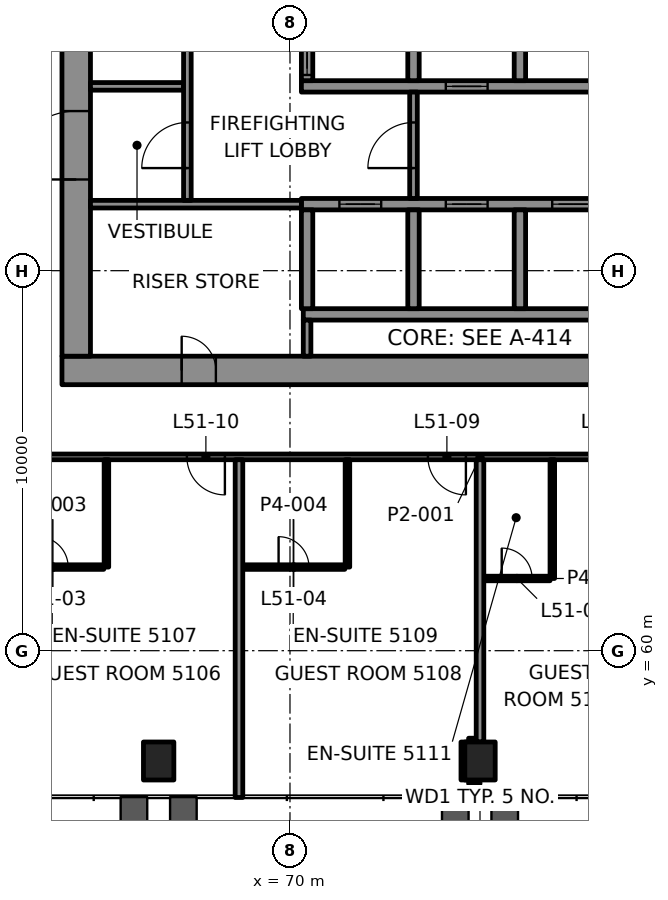
"""IFC4 building model, lengths in metres.
Left out: names, types, materials, properties, quantities, classifications, styles, units other than length and angle.
Written with IfcOpenShell. Run it as: python <this file> out.ifc"""

import sys

from ifc_helpers import new_model, si_unit, direction, frame, frame_2d, origin, origin_2d, place, context, subcontext, project, spatial, rectangle, hollow_rectangle, extrude, element, fill, save


model = new_model("IFC4")
c1 = context("Model", 3, precision=1e-05, world=origin(), true_north=direction((0.0, 1.0)))
c2 = subcontext(c1, "Body", "Model", "MODEL_VIEW")
j1 = project(units=[si_unit("LENGTHUNIT", "METRE"), si_unit("PLANEANGLEUNIT", "RADIAN")], contexts=[c1])
p1 = place(None, origin())
s1 = spatial("IfcSite", under=j1, at=p1, CompositionType="ELEMENT")
p2 = place(p1, origin())
s2 = spatial("IfcBuilding", under=s1, at=p2, CompositionType="ELEMENT")
p3 = place(p2, frame((0.0, 0.0, 218.2)))
s3 = spatial("IfcBuildingStorey", under=s2, at=p3, CompositionType="ELEMENT", Elevation=218.2)
for number, where, z_axis, x_axis in (
    (1, (66.544, 57.097, -0.0), (0.0, 0.0, 1.0), (1.0, 0.0, 0.0)),
    (2, (75.0, 57.097, -0.0), (0.0, 0.0, 1.0), (1.0, 0.0, 0.0)),
):
    element("IfcColumn", number, at=place(p3, frame(where, z_axis=z_axis, x_axis=x_axis)), inside=s3, PredefinedType="COLUMN", context=c2, shape_type="SweptSolid", body=[
        extrude(hollow_rectangle(XDim=0.8, YDim=1.0, WallThickness=0.05, at=origin_2d()), origin(), (0.0, 0.0, 1.0), 3.9),
    ])
p4 = place(p3, frame((64.0, 67.375, 0.0), z_axis=(0.0, 0.0, 1.0), x_axis=(1.0, 0.0, 0.0)))
e3 = element("IfcWall", 3, at=p4, inside=s3, PredefinedType="SHEAR", context=c2, shape_type="SweptSolid", body=[
    extrude(rectangle(XDim=22.0, YDim=0.75, at=frame_2d((11.0, 0.0))), origin(), (0.0, 0.0, 1.0), 3.7),
])
p5 = place(p4, frame((3.15, 0.0, 0.0)))
e4 = element("IfcOpeningElement", 4, at=p5, cuts=e3, PredefinedType="OPENING", context=c2, shape_type="SweptSolid", body=[
    extrude(rectangle(XDim=0.9, YDim=2.1, at=frame_2d((0.45, 1.05))), frame((0.0, 0.385, 0.0), z_axis=(0.0, -1.0, 0.0), x_axis=(1.0, 0.0, 0.0)), (0.0, 0.0, 1.0), 0.77),
])
p6 = place(p3, frame((64.375, 67.75, 0.0), z_axis=(0.0, 0.0, 1.0), x_axis=(0.0, 1.0, 0.0)))
e5 = element("IfcWall", 5, at=p6, inside=s3, PredefinedType="SHEAR", context=c2, shape_type="SweptSolid", body=[
    extrude(rectangle(XDim=14.5, YDim=0.75, at=frame_2d((7.25, 0.0))), origin(), (0.0, 0.0, 1.0), 3.7),
])
p7 = place(p6, frame((4.65, 0.0, 0.0)))
e6 = element("IfcOpeningElement", 6, at=p7, cuts=e5, PredefinedType="OPENING", context=c2, shape_type="SweptSolid", body=[
    extrude(rectangle(XDim=1.8, YDim=2.1, at=frame_2d((0.9, 1.05))), frame((0.0, 0.385, 0.0), z_axis=(0.0, -1.0, 0.0), x_axis=(1.0, 0.0, 0.0)), (0.0, 0.0, 1.0), 0.77),
])
p8 = place(p6, frame((8.5, 0.0, 0.0)))
e7 = element("IfcOpeningElement", 7, at=p8, cuts=e5, PredefinedType="OPENING", context=c2, shape_type="SweptSolid", body=[
    extrude(rectangle(XDim=0.9, YDim=2.1, at=frame_2d((0.45, 1.05))), frame((0.0, 0.385, 0.0), z_axis=(0.0, -1.0, 0.0), x_axis=(1.0, 0.0, 0.0)), (0.0, 0.0, 1.0), 0.77),
])
p9 = place(p6, frame((12.2, 0.0, 0.0)))
e8 = element("IfcOpeningElement", 8, at=p9, cuts=e5, PredefinedType="OPENING", context=c2, shape_type="SweptSolid", body=[
    extrude(rectangle(XDim=0.9, YDim=2.1, at=frame_2d((0.45, 1.05))), frame((0.0, 0.385, 0.0), z_axis=(0.0, -1.0, 0.0), x_axis=(1.0, 0.0, 0.0)), (0.0, 0.0, 1.0), 0.77),
])
p10 = place(p3, frame((70.35, 68.85, 0.0), z_axis=(0.0, 0.0, 1.0), x_axis=(1.0, 0.0, 0.0)))
e9 = element("IfcWall", 9, at=p10, inside=s3, PredefinedType="SHEAR", context=c2, shape_type="SweptSolid", body=[
    extrude(rectangle(XDim=14.2, YDim=0.3, at=frame_2d((7.1, 0.0))), origin(), (0.0, 0.0, 1.0), 3.7),
])
p11 = place(p3, frame((70.3, 71.75, 0.0), z_axis=(0.0, 0.0, 1.0), x_axis=(1.0, 0.0, 0.0)))
e10 = element("IfcWall", 10, at=p11, inside=s3, PredefinedType="SHEAR", context=c2, shape_type="SweptSolid", body=[
    extrude(rectangle(XDim=14.3, YDim=0.3, at=frame_2d((7.15, 0.0))), origin(), (0.0, 0.0, 1.0), 3.7),
])
p12 = place(p11, frame((1.0, 0.0, 0.0)))
e11 = element("IfcOpeningElement", 11, at=p12, cuts=e10, PredefinedType="OPENING", context=c2, shape_type="SweptSolid", body=[
    extrude(rectangle(XDim=1.1, YDim=2.1, at=frame_2d((0.55, 1.05))), frame((0.0, 0.16, 0.0), z_axis=(0.0, -1.0, 0.0), x_axis=(1.0, 0.0, 0.0)), (0.0, 0.0, 1.0), 0.32),
])
p13 = place(p11, frame((3.8, 0.0, 0.0)))
e12 = element("IfcOpeningElement", 12, at=p13, cuts=e10, PredefinedType="OPENING", context=c2, shape_type="SweptSolid", body=[
    extrude(rectangle(XDim=1.1, YDim=2.1, at=frame_2d((0.55, 1.05))), frame((0.0, 0.16, 0.0), z_axis=(0.0, -1.0, 0.0), x_axis=(1.0, 0.0, 0.0)), (0.0, 0.0, 1.0), 0.32),
])
p14 = place(p11, frame((6.6, 0.0, 0.0)))
e13 = element("IfcOpeningElement", 13, at=p14, cuts=e10, PredefinedType="OPENING", context=c2, shape_type="SweptSolid", body=[
    extrude(rectangle(XDim=1.1, YDim=2.1, at=frame_2d((0.55, 1.05))), frame((0.0, 0.16, 0.0), z_axis=(0.0, -1.0, 0.0), x_axis=(1.0, 0.0, 0.0)), (0.0, 0.0, 1.0), 0.32),
])
p15 = place(p11, frame((9.4, 0.0, 0.0)))
e14 = element("IfcOpeningElement", 14, at=p15, cuts=e10, PredefinedType="OPENING", context=c2, shape_type="SweptSolid", body=[
    extrude(rectangle(XDim=1.1, YDim=2.1, at=frame_2d((0.55, 1.05))), frame((0.0, 0.16, 0.0), z_axis=(0.0, -1.0, 0.0), x_axis=(1.0, 0.0, 0.0)), (0.0, 0.0, 1.0), 0.32),
])
p16 = place(p11, frame((12.2, 0.0, 0.0)))
e15 = element("IfcOpeningElement", 15, at=p16, cuts=e10, PredefinedType="OPENING", context=c2, shape_type="SweptSolid", body=[
    extrude(rectangle(XDim=1.1, YDim=2.1, at=frame_2d((0.55, 1.05))), frame((0.0, 0.16, 0.0), z_axis=(0.0, -1.0, 0.0), x_axis=(1.0, 0.0, 0.0)), (0.0, 0.0, 1.0), 0.32),
])
p17 = place(p3, frame((70.3, 74.85, 0.0), z_axis=(0.0, 0.0, 1.0), x_axis=(1.0, 0.0, 0.0)))
e16 = element("IfcWall", 16, at=p17, inside=s3, PredefinedType="SHEAR", context=c2, shape_type="SweptSolid", body=[
    extrude(rectangle(XDim=14.3, YDim=0.3, at=frame_2d((7.15, 0.0))), origin(), (0.0, 0.0, 1.0), 3.7),
])
p18 = place(p17, frame((3.8, 0.0, 0.0)))
e17 = element("IfcOpeningElement", 17, at=p18, cuts=e16, PredefinedType="OPENING", context=c2, shape_type="SweptSolid", body=[
    extrude(rectangle(XDim=1.1, YDim=2.1, at=frame_2d((0.55, 1.05))), frame((0.0, 0.16, 0.0), z_axis=(0.0, -1.0, 0.0), x_axis=(1.0, 0.0, 0.0)), (0.0, 0.0, 1.0), 0.32),
])
p19 = place(p17, frame((12.2, 0.0, 0.0)))
e18 = element("IfcOpeningElement", 18, at=p19, cuts=e16, PredefinedType="OPENING", context=c2, shape_type="SweptSolid", body=[
    extrude(rectangle(XDim=1.1, YDim=2.1, at=frame_2d((0.55, 1.05))), frame((0.0, 0.16, 0.0), z_axis=(0.0, -1.0, 0.0), x_axis=(1.0, 0.0, 0.0)), (0.0, 0.0, 1.0), 0.32),
])
p20 = place(p3, frame((70.45, 69.0, 0.0), z_axis=(0.0, 0.0, 1.0), x_axis=(0.0, 1.0, 0.0)))
e19 = element("IfcWall", 19, at=p20, inside=s3, PredefinedType="SHEAR", context=c2, shape_type="SweptSolid", body=[
    extrude(rectangle(XDim=2.6, YDim=0.3, at=frame_2d((1.3, 0.0))), origin(), (0.0, 0.0, 1.0), 3.7),
])
p21 = place(p3, frame((70.45, 75.0, 0.0), z_axis=(0.0, 0.0, 1.0), x_axis=(0.0, 1.0, 0.0)))
e20 = element("IfcWall", 20, at=p21, inside=s3, PredefinedType="SHEAR", context=c2, shape_type="SweptSolid", body=[
    extrude(rectangle(XDim=2.6, YDim=0.3, at=frame_2d((1.3, 0.0))), origin(), (0.0, 0.0, 1.0), 3.7),
])
p22 = place(p21, frame((0.15, 0.0, 0.0)))
e21 = element("IfcOpeningElement", 21, at=p22, cuts=e20, PredefinedType="OPENING", context=c2, shape_type="SweptSolid", body=[
    extrude(rectangle(XDim=1.1, YDim=2.1, at=frame_2d((0.55, 1.05))), frame((0.0, 0.16, 0.0), z_axis=(0.0, -1.0, 0.0), x_axis=(1.0, 0.0, 0.0)), (0.0, 0.0, 1.0), 0.32),
])
for number, where, z_axis, x_axis in (
    (22, (73.25, 69.0, 0.0), (0.0, 0.0, 1.0), (0.0, 1.0, 0.0)),
    (23, (73.25, 75.0, 0.0), (0.0, 0.0, 1.0), (0.0, 1.0, 0.0)),
    (24, (76.05, 69.0, 0.0), (0.0, 0.0, 1.0), (0.0, 1.0, 0.0)),
    (25, (76.05, 75.0, 0.0), (0.0, 0.0, 1.0), (0.0, 1.0, 0.0)),
):
    element("IfcWall", number, at=place(p3, frame(where, z_axis=z_axis, x_axis=x_axis)), inside=s3, PredefinedType="SHEAR", context=c2, shape_type="SweptSolid", body=[
        extrude(rectangle(XDim=2.6, YDim=0.3, at=frame_2d((1.3, 0.0))), origin(), (0.0, 0.0, 1.0), 3.7),
    ])
p23 = place(p3, frame((74.7, 56.597, 0.0), z_axis=(0.0, 0.0, 1.0), x_axis=(1.0, 0.0, 0.0)))
e26 = element("IfcWall", 26, at=p23, inside=s3, PredefinedType="PARTITIONING", context=c2, shape_type="SweptSolid", body=[
    extrude(rectangle(XDim=0.299, YDim=0.2, at=frame_2d((0.149, 0.0))), origin(), (0.0, 0.0, 1.0), 3.1),
])
p24 = place(p3, frame((74.7, 57.597, 0.0), z_axis=(0.0, 0.0, 1.0), x_axis=(1.0, 0.0, 0.0)))
e27 = element("IfcWall", 27, at=p24, inside=s3, PredefinedType="PARTITIONING", context=c2, shape_type="SweptSolid", body=[
    extrude(rectangle(XDim=0.199, YDim=0.2, at=frame_2d((0.1, 0.0))), origin(), (0.0, 0.0, 1.0), 3.1),
])
p25 = place(p3, frame((75.1, 61.9, 0.0), z_axis=(0.0, 0.0, 1.0), x_axis=(1.0, 0.0, 0.0)))
e28 = element("IfcWall", 28, at=p25, inside=s3, PredefinedType="PARTITIONING", context=c2, shape_type="SweptSolid", body=[
    extrude(rectangle(XDim=1.742, YDim=0.12, at=frame_2d((0.871, 0.0))), origin(), (0.0, 0.0, 1.0), 3.1),
])
p26 = place(p25, frame((0.471, 0.0, 0.0)))
e29 = element("IfcOpeningElement", 29, at=p26, cuts=e28, PredefinedType="OPENING", context=c2, shape_type="SweptSolid", body=[
    extrude(rectangle(XDim=0.8, YDim=2.1, at=frame_2d((0.4, 1.05))), frame((0.0, 0.07, 0.0), z_axis=(0.0, -1.0, 0.0), x_axis=(1.0, 0.0, 0.0)), (0.0, 0.0, 1.0), 0.14),
])
p27 = place(p3, frame((62.427, 62.2, 0.0), z_axis=(0.0, 0.0, 1.0), x_axis=(1.0, 0.0, 0.0)))
e30 = element("IfcWall", 30, at=p27, inside=s3, PredefinedType="PARTITIONING", context=c2, shape_type="SweptSolid", body=[
    extrude(rectangle(XDim=2.674, YDim=0.12, at=frame_2d((1.337, 0.0))), origin(), (0.0, 0.0, 1.0), 3.1),
])
p28 = place(p27, frame((0.937, 0.0, 0.0)))
e31 = element("IfcOpeningElement", 31, at=p28, cuts=e30, PredefinedType="OPENING", context=c2, shape_type="SweptSolid", body=[
    extrude(rectangle(XDim=0.8, YDim=2.1, at=frame_2d((0.4, 1.05))), frame((0.0, 0.07, 0.0), z_axis=(0.0, -1.0, 0.0), x_axis=(1.0, 0.0, 0.0)), (0.0, 0.0, 1.0), 0.14),
])
p29 = place(p3, frame((68.758, 62.2, 0.0), z_axis=(0.0, 0.0, 1.0), x_axis=(1.0, 0.0, 0.0)))
e32 = element("IfcWall", 32, at=p29, inside=s3, PredefinedType="PARTITIONING", context=c2, shape_type="SweptSolid", body=[
    extrude(rectangle(XDim=2.684, YDim=0.12, at=frame_2d((1.342, 0.0))), origin(), (0.0, 0.0, 1.0), 3.1),
])
p30 = place(p29, frame((0.942, 0.0, 0.0)))
e33 = element("IfcOpeningElement", 33, at=p30, cuts=e32, PredefinedType="OPENING", context=c2, shape_type="SweptSolid", body=[
    extrude(rectangle(XDim=0.8, YDim=2.1, at=frame_2d((0.4, 1.05))), frame((0.0, 0.07, 0.0), z_axis=(0.0, -1.0, 0.0), x_axis=(1.0, 0.0, 0.0)), (0.0, 0.0, 1.0), 0.14),
])
p31 = place(p3, frame((87.899, 65.1, 0.0), z_axis=(0.0, 0.0, 1.0), x_axis=(-1.0, 0.0, 0.0)))
e34 = element("IfcWall", 34, at=p31, inside=s3, PredefinedType="PARTITIONING", context=c2, shape_type="SweptSolid", body=[
    extrude(rectangle(XDim=25.799, YDim=0.15, at=frame_2d((12.899, 0.0))), origin(), (0.0, 0.0, 1.0), 3.1),
])
p32 = place(p31, frame((0.259, 0.0, 0.0)))
e35 = element("IfcOpeningElement", 35, at=p32, cuts=e34, PredefinedType="OPENING", context=c2, shape_type="SweptSolid", body=[
    extrude(rectangle(XDim=1.0, YDim=2.1, at=frame_2d((0.5, 1.05))), frame((0.0, 0.085, 0.0), z_axis=(0.0, -1.0, 0.0), x_axis=(1.0, 0.0, 0.0)), (0.0, 0.0, 1.0), 0.17),
])
p33 = place(p31, frame((4.641, 0.0, 0.0)))
e36 = element("IfcOpeningElement", 36, at=p33, cuts=e34, PredefinedType="OPENING", context=c2, shape_type="SweptSolid", body=[
    extrude(rectangle(XDim=1.0, YDim=2.1, at=frame_2d((0.5, 1.05))), frame((0.0, 0.085, 0.0), z_axis=(0.0, -1.0, 0.0), x_axis=(1.0, 0.0, 0.0)), (0.0, 0.0, 1.0), 0.17),
])
p34 = place(p31, frame((8.868, 0.0, 0.0)))
e37 = element("IfcOpeningElement", 37, at=p34, cuts=e34, PredefinedType="OPENING", context=c2, shape_type="SweptSolid", body=[
    extrude(rectangle(XDim=1.0, YDim=2.1, at=frame_2d((0.5, 1.05))), frame((0.0, 0.085, 0.0), z_axis=(0.0, -1.0, 0.0), x_axis=(1.0, 0.0, 0.0)), (0.0, 0.0, 1.0), 0.17),
])
p35 = place(p31, frame((13.271, 0.0, 0.0)))
e38 = element("IfcOpeningElement", 38, at=p35, cuts=e34, PredefinedType="OPENING", context=c2, shape_type="SweptSolid", body=[
    extrude(rectangle(XDim=1.0, YDim=2.1, at=frame_2d((0.5, 1.05))), frame((0.0, 0.085, 0.0), z_axis=(0.0, -1.0, 0.0), x_axis=(1.0, 0.0, 0.0)), (0.0, 0.0, 1.0), 0.17),
])
p36 = place(p31, frame((19.612, 0.0, 0.0)))
e39 = element("IfcOpeningElement", 39, at=p36, cuts=e34, PredefinedType="OPENING", context=c2, shape_type="SweptSolid", body=[
    extrude(rectangle(XDim=1.0, YDim=2.1, at=frame_2d((0.5, 1.05))), frame((0.0, 0.085, 0.0), z_axis=(0.0, -1.0, 0.0), x_axis=(1.0, 0.0, 0.0)), (0.0, 0.0, 1.0), 0.17),
])
p37 = place(p3, frame((76.903, 61.9, 0.0), z_axis=(0.0, 0.0, 1.0), x_axis=(0.0, 1.0, 0.0)))
e40 = element("IfcWall", 40, at=p37, inside=s3, PredefinedType="PARTITIONING", context=c2, shape_type="SweptSolid", body=[
    extrude(rectangle(XDim=3.125, YDim=0.12, at=frame_2d((1.562, 0.0))), origin(), (0.0, 0.0, 1.0), 3.1),
])
p38 = place(p3, frame((75.0, 57.598, 0.0), z_axis=(0.0, 0.0, 1.0), x_axis=(0.0, 1.0, 0.0)))
e41 = element("IfcWall", 41, at=p38, inside=s3, PredefinedType="PARTITIONING", context=c2, shape_type="SweptSolid", body=[
    extrude(rectangle(XDim=7.427, YDim=0.2, at=frame_2d((3.713, 0.0))), origin(), (0.0, 0.0, 1.0), 3.1),
])
p39 = place(p3, frame((74.6, 56.598, 0.0), z_axis=(0.0, 0.0, 1.0), x_axis=(0.0, 1.0, 0.0)))
e42 = element("IfcWall", 42, at=p39, inside=s3, PredefinedType="PARTITIONING", context=c2, shape_type="SweptSolid", body=[
    extrude(rectangle(XDim=0.999, YDim=0.2, at=frame_2d((0.5, 0.0))), origin(), (0.0, 0.0, 1.0), 3.022),
])
p40 = place(p3, frame((71.512, 62.2, 0.0), z_axis=(0.0, 0.0, 1.0), x_axis=(0.0, 1.0, 0.0)))
e43 = element("IfcWall", 43, at=p40, inside=s3, PredefinedType="PARTITIONING", context=c2, shape_type="SweptSolid", body=[
    extrude(rectangle(XDim=2.825, YDim=0.12, at=frame_2d((1.413, 0.0))), origin(), (0.0, 0.0, 1.0), 3.1),
])
p41 = place(p3, frame((68.658, 56.137, 0.0), z_axis=(0.0, 0.0, 1.0), x_axis=(0.0, 1.0, 0.0)))
e44 = element("IfcWall", 44, at=p41, inside=s3, PredefinedType="PARTITIONING", context=c2, shape_type="SweptSolid", body=[
    extrude(rectangle(XDim=8.887, YDim=0.2, at=frame_2d((4.444, 0.0))), origin(), (0.0, 0.0, 1.0), 3.022),
])
p42 = place(p3, frame((65.17, 62.2, 0.0), z_axis=(0.0, 0.0, 1.0), x_axis=(0.0, 1.0, 0.0)))
e45 = element("IfcWall", 45, at=p42, inside=s3, PredefinedType="PARTITIONING", context=c2, shape_type="SweptSolid", body=[
    extrude(rectangle(XDim=2.825, YDim=0.12, at=frame_2d((1.413, 0.0))), origin(), (0.0, 0.0, 1.0), 3.1),
])
p43 = place(p3, frame((64.75, 71.75, 0.0), z_axis=(0.0, 0.0, 1.0), x_axis=(1.0, 0.0, 0.0)))
e46 = element("IfcWall", 46, at=p43, inside=s3, PredefinedType="PARTITIONING", context=c2, shape_type="SweptSolid", body=[
    extrude(rectangle(XDim=5.55, YDim=0.2, at=frame_2d((2.775, 0.0))), origin(), (0.0, 0.0, 1.0), 3.7),
])
p44 = place(p3, frame((64.75, 74.85, 0.0), z_axis=(0.0, 0.0, 1.0), x_axis=(1.0, 0.0, 0.0)))
e47 = element("IfcWall", 47, at=p44, inside=s3, PredefinedType="PARTITIONING", context=c2, shape_type="SweptSolid", body=[
    extrude(rectangle(XDim=2.45, YDim=0.2, at=frame_2d((1.225, 0.0))), origin(), (0.0, 0.0, 1.0), 3.7),
])
p45 = place(p3, frame((67.3, 71.85, 0.0), z_axis=(0.0, 0.0, 1.0), x_axis=(0.0, 1.0, 0.0)))
e48 = element("IfcWall", 48, at=p45, inside=s3, PredefinedType="PARTITIONING", context=c2, shape_type="SweptSolid", body=[
    extrude(rectangle(XDim=5.75, YDim=0.2, at=frame_2d((2.875, 0.0))), origin(), (0.0, 0.0, 1.0), 3.7),
])
p46 = place(p45, frame((0.85, 0.0, 0.0)))
e49 = element("IfcOpeningElement", 49, at=p46, cuts=e48, PredefinedType="OPENING", context=c2, shape_type="SweptSolid", body=[
    extrude(rectangle(XDim=1.2, YDim=2.1, at=frame_2d((0.6, 1.05))), frame((0.0, 0.11, 0.0), z_axis=(0.0, -1.0, 0.0), x_axis=(1.0, 0.0, 0.0)), (0.0, 0.0, 1.0), 0.22),
])
p47 = place(p3, frame((70.45, 67.75, 0.0), z_axis=(0.0, 0.0, 1.0), x_axis=(0.0, 1.0, 0.0)))
e50 = element("IfcWall", 50, at=p47, inside=s3, PredefinedType="PARTITIONING", context=c2, shape_type="SweptSolid", body=[
    extrude(rectangle(XDim=0.95, YDim=0.2, at=frame_2d((0.475, 0.0))), origin(), (0.0, 0.0, 1.0), 3.7),
])
p48 = place(p3, frame((73.25, 71.9, 0.0), z_axis=(0.0, 0.0, 1.0), x_axis=(0.0, 1.0, 0.0)))
e51 = element("IfcWall", 51, at=p48, inside=s3, PredefinedType="PARTITIONING", context=c2, shape_type="SweptSolid", body=[
    extrude(rectangle(XDim=2.8, YDim=0.2, at=frame_2d((1.4, 0.0))), origin(), (0.0, 0.0, 1.0), 3.7),
])
p49 = place(p48, frame((0.8, 0.0, 0.0)))
e52 = element("IfcOpeningElement", 52, at=p49, cuts=e51, PredefinedType="OPENING", context=c2, shape_type="SweptSolid", body=[
    extrude(rectangle(XDim=1.2, YDim=2.1, at=frame_2d((0.6, 1.05))), frame((0.0, 0.11, 0.0), z_axis=(0.0, -1.0, 0.0), x_axis=(1.0, 0.0, 0.0)), (0.0, 0.0, 1.0), 0.22),
])
p50 = place(p26, origin())
e53 = element("IfcDoor", 53, at=p50, inside=s3, OperationType="SINGLE_SWING_RIGHT", PredefinedType="DOOR", context=c2, shape_type="SweptSolid", body=[
    extrude(rectangle(XDim=0.8, YDim=2.1, at=frame_2d((0.4, 1.05))), frame((0.0, 0.025, 0.0), z_axis=(0.0, -1.0, 0.0), x_axis=(1.0, 0.0, 0.0)), (0.0, 0.0, 1.0), 0.05),
])
fill(e29, e53)
p51 = place(p28, origin())
e54 = element("IfcDoor", 54, at=p51, inside=s3, OperationType="SINGLE_SWING_RIGHT", PredefinedType="DOOR", context=c2, shape_type="SweptSolid", body=[
    extrude(rectangle(XDim=0.8, YDim=2.1, at=frame_2d((0.4, 1.05))), frame((0.0, 0.025, 0.0), z_axis=(0.0, -1.0, 0.0), x_axis=(1.0, 0.0, 0.0)), (0.0, 0.0, 1.0), 0.05),
])
fill(e31, e54)
p52 = place(p30, origin())
e55 = element("IfcDoor", 55, at=p52, inside=s3, OperationType="SINGLE_SWING_RIGHT", PredefinedType="DOOR", context=c2, shape_type="SweptSolid", body=[
    extrude(rectangle(XDim=0.8, YDim=2.1, at=frame_2d((0.4, 1.05))), frame((0.0, 0.025, 0.0), z_axis=(0.0, -1.0, 0.0), x_axis=(1.0, 0.0, 0.0)), (0.0, 0.0, 1.0), 0.05),
])
fill(e33, e55)
p53 = place(p35, origin())
e56 = element("IfcDoor", 56, at=p53, inside=s3, OperationType="SINGLE_SWING_RIGHT", PredefinedType="DOOR", context=c2, shape_type="SweptSolid", body=[
    extrude(rectangle(XDim=1.0, YDim=2.1, at=frame_2d((0.5, 1.05))), frame((0.0, 0.025, 0.0), z_axis=(0.0, -1.0, 0.0), x_axis=(1.0, 0.0, 0.0)), (0.0, 0.0, 1.0), 0.05),
])
fill(e38, e56)
p54 = place(p36, origin())
e57 = element("IfcDoor", 57, at=p54, inside=s3, OperationType="SINGLE_SWING_RIGHT", PredefinedType="DOOR", context=c2, shape_type="SweptSolid", body=[
    extrude(rectangle(XDim=1.0, YDim=2.1, at=frame_2d((0.5, 1.05))), frame((0.0, 0.025, 0.0), z_axis=(0.0, -1.0, 0.0), x_axis=(1.0, 0.0, 0.0)), (0.0, 0.0, 1.0), 0.05),
])
fill(e39, e57)
p55 = place(p12, origin())
e58 = element("IfcDoor", 58, at=p55, inside=s3, OperationType="DOUBLE_DOOR_SLIDING", PredefinedType="DOOR", context=c2, shape_type="SweptSolid", body=[
    extrude(rectangle(XDim=1.1, YDim=2.1, at=frame_2d((0.55, 1.05))), frame((0.0, 0.025, 0.0), z_axis=(0.0, -1.0, 0.0), x_axis=(1.0, 0.0, 0.0)), (0.0, 0.0, 1.0), 0.05),
])
fill(e11, e58)
p56 = place(p13, origin())
e59 = element("IfcDoor", 59, at=p56, inside=s3, OperationType="DOUBLE_DOOR_SLIDING", PredefinedType="DOOR", context=c2, shape_type="SweptSolid", body=[
    extrude(rectangle(XDim=1.1, YDim=2.1, at=frame_2d((0.55, 1.05))), frame((0.0, 0.025, 0.0), z_axis=(0.0, -1.0, 0.0), x_axis=(1.0, 0.0, 0.0)), (0.0, 0.0, 1.0), 0.05),
])
fill(e12, e59)
p57 = place(p14, origin())
e60 = element("IfcDoor", 60, at=p57, inside=s3, OperationType="DOUBLE_DOOR_SLIDING", PredefinedType="DOOR", context=c2, shape_type="SweptSolid", body=[
    extrude(rectangle(XDim=1.1, YDim=2.1, at=frame_2d((0.55, 1.05))), frame((0.0, 0.025, 0.0), z_axis=(0.0, -1.0, 0.0), x_axis=(1.0, 0.0, 0.0)), (0.0, 0.0, 1.0), 0.05),
])
fill(e13, e60)
p58 = place(p22, origin())
e61 = element("IfcDoor", 61, at=p58, inside=s3, OperationType="DOUBLE_DOOR_SLIDING", PredefinedType="DOOR", context=c2, shape_type="SweptSolid", body=[
    extrude(rectangle(XDim=1.1, YDim=2.1, at=frame_2d((0.55, 1.05))), frame((0.0, 0.025, 0.0), z_axis=(0.0, -1.0, 0.0), x_axis=(1.0, 0.0, 0.0)), (0.0, 0.0, 1.0), 0.05),
])
fill(e21, e61)
p59 = place(p18, origin())
e62 = element("IfcDoor", 62, at=p59, inside=s3, OperationType="DOUBLE_DOOR_SLIDING", PredefinedType="DOOR", context=c2, shape_type="SweptSolid", body=[
    extrude(rectangle(XDim=1.1, YDim=2.1, at=frame_2d((0.55, 1.05))), frame((0.0, 0.025, 0.0), z_axis=(0.0, -1.0, 0.0), x_axis=(1.0, 0.0, 0.0)), (0.0, 0.0, 1.0), 0.05),
])
fill(e17, e62)
p60 = place(p49, origin())
e63 = element("IfcDoor", 63, at=p60, inside=s3, OperationType="SINGLE_SWING_LEFT", PredefinedType="DOOR", context=c2, shape_type="SweptSolid", body=[
    extrude(rectangle(XDim=1.2, YDim=2.1, at=frame_2d((0.6, 1.05))), frame((0.0, 0.025, 0.0), z_axis=(0.0, -1.0, 0.0), x_axis=(1.0, 0.0, 0.0)), (0.0, 0.0, 1.0), 0.05),
])
fill(e52, e63)
p61 = place(p46, origin())
e64 = element("IfcDoor", 64, at=p61, inside=s3, OperationType="SINGLE_SWING_RIGHT", PredefinedType="DOOR", context=c2, shape_type="SweptSolid", body=[
    extrude(rectangle(XDim=1.2, YDim=2.1, at=frame_2d((0.6, 1.05))), frame((0.0, 0.025, 0.0), z_axis=(0.0, -1.0, 0.0), x_axis=(1.0, 0.0, 0.0)), (0.0, 0.0, 1.0), 0.05),
])
fill(e49, e64)
p62 = place(p7, origin())
e65 = element("IfcDoor", 65, at=p62, inside=s3, OperationType="SINGLE_SWING_LEFT", PredefinedType="DOOR", context=c2, shape_type="SweptSolid", body=[
    extrude(rectangle(XDim=1.8, YDim=2.1, at=frame_2d((0.9, 1.05))), frame((0.0, 0.095, 0.0), z_axis=(0.0, -1.0, 0.0), x_axis=(1.0, 0.0, 0.0)), (0.0, 0.0, 1.0), 0.19),
])
fill(e6, e65)
p63 = place(p5, origin())
e66 = element("IfcDoor", 66, at=p63, inside=s3, OperationType="SINGLE_SWING_LEFT", PredefinedType="DOOR", context=c2, shape_type="SweptSolid", body=[
    extrude(rectangle(XDim=0.9, YDim=2.1, at=frame_2d((0.45, 1.05))), frame((0.0, 0.095, 0.0), z_axis=(0.0, -1.0, 0.0), x_axis=(1.0, 0.0, 0.0)), (0.0, 0.0, 1.0), 0.19),
])
fill(e4, e66)
save(model, sys.argv[1])
